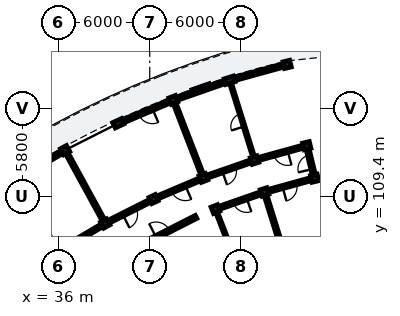
"""IFC4 building model, lengths in metres.
Left out: names, types, materials, properties, quantities, classifications, styles, units other than length and angle.
Written with IfcOpenShell. Run it as: python <this file> out.ifc"""

import sys

from ifc_helpers import new_model, si_unit, direction, frame, frame_2d, origin, origin_2d, place, context, subcontext, project, spatial, rectangle, extrude, element, fill, save


model = new_model("IFC4")
c1 = context("Model", 3, precision=1e-05, world=origin(), true_north=direction((0.0, 1.0)))
c2 = subcontext(c1, "Body", "Model", "MODEL_VIEW")
j1 = project(units=[si_unit("LENGTHUNIT", "METRE"), si_unit("PLANEANGLEUNIT", "RADIAN")], contexts=[c1])
p1 = place(None, origin())
s1 = spatial("IfcSite", under=j1, at=p1, CompositionType="ELEMENT")
p2 = place(p1, origin())
s2 = spatial("IfcBuilding", under=s1, at=p2, CompositionType="ELEMENT")
p3 = place(p2, frame((0.0, 0.0, 42.44)))
s3 = spatial("IfcBuildingStorey", under=s2, at=p3, CompositionType="ELEMENT", Elevation=42.44)
for number, where, z_axis, x_axis in (
    (1, (52.847, 110.606, 0.0), (0.0, 0.0, 1.0), (-0.234, 0.972, 0.0)),
    (2, (52.331, 112.744, 0.0), (0.0, 0.0, 1.0), (-0.234, 0.972, 0.0)),
    (3, (51.042, 118.091, 0.0), (0.0, 0.0, 1.0), (-0.234, 0.972, 0.0)),
    (4, (49.552, 109.695, 0.0), (0.0, 0.0, 1.0), (-0.298, 0.955, 0.0)),
    (5, (48.897, 111.795, 0.0), (0.0, 0.0, 1.0), (-0.298, 0.955, 0.0)),
):
    element("IfcColumn", number, at=place(p3, frame(where, z_axis=z_axis, x_axis=x_axis)), inside=s3, PredefinedType="COLUMN", context=c2, shape_type="SweptSolid", body=[
        extrude(rectangle(XDim=0.45, YDim=0.45, at=origin_2d()), origin(), (0.0, 0.0, 1.0), 3.12),
    ])
p4 = place(p3, frame((47.258, 117.046, 0.0), z_axis=(0.0, 0.0, 1.0), x_axis=(-0.297930292146, 0.954587628781, 0.0)))
e6 = element("IfcColumn", 6, at=p4, inside=s3, PredefinedType="PILASTER", context=c2, shape_type="SweptSolid", body=[
    extrude(rectangle(XDim=0.39, YDim=0.63, at=origin_2d()), origin(), (0.0, 0.0, 1.0), 3.12),
])
for number, where, z_axis, x_axis in (
    (7, (46.325, 108.57, 0.0), (0.0, 0.0, 1.0), (-0.36, 0.933, 0.0)),
    (8, (45.532, 110.622, 0.0), (0.0, 0.0, 1.0), (-0.36, 0.933, 0.0)),
    (9, (43.552, 115.753, 0.0), (0.0, 0.0, 1.0), (-0.36, 0.933, 0.0)),
    (10, (42.252, 109.23, 0.0), (0.0, 0.0, 1.0), (-0.421, 0.907, 0.0)),
):
    element("IfcColumn", number, at=place(p3, frame(where, z_axis=z_axis, x_axis=x_axis)), inside=s3, PredefinedType="COLUMN", context=c2, shape_type="SweptSolid", body=[
        extrude(rectangle(XDim=0.45, YDim=0.45, at=origin_2d()), origin(), (0.0, 0.0, 1.0), 3.12),
    ])
p5 = place(p3, frame((39.938, 114.219, 0.0), z_axis=(0.0, 0.0, 1.0), x_axis=(-0.420859924104, 0.907125638643, 0.0)))
e11 = element("IfcColumn", 11, at=p5, inside=s3, PredefinedType="PILASTER", context=c2, shape_type="SweptSolid", body=[
    extrude(rectangle(XDim=0.39, YDim=0.63, at=origin_2d()), origin(), (0.0, 0.0, 1.0), 3.12),
])
for number, where, z_axis, x_axis in (
    (12, (39.072, 107.625, 0.0), (0.0, 0.0, 1.0), (-0.48, 0.877, 0.0)),
    (13, (36.433, 112.451, 0.0), (0.0, 0.0, 1.0), (-0.48, 0.877, 0.0)),
):
    element("IfcColumn", number, at=place(p3, frame(where, z_axis=z_axis, x_axis=x_axis)), inside=s3, PredefinedType="COLUMN", context=c2, shape_type="SweptSolid", body=[
        extrude(rectangle(XDim=0.45, YDim=0.45, at=origin_2d()), origin(), (0.0, 0.0, 1.0), 3.12),
    ])
p6 = place(p3, frame((50.854, 118.039, 0.0), z_axis=(0.0, 0.0, 1.0), x_axis=(-0.963879958287, -0.266337053398, 0.0)))
e14 = element("IfcWall", 14, at=p6, inside=s3, PredefinedType="SOLIDWALL", context=c2, shape_type="SweptSolid", body=[
    extrude(rectangle(XDim=3.566, YDim=0.225, at=frame_2d((1.783, 0.0))), origin(), (0.0, 0.0, 1.0), 2.355),
])
p7 = place(p6, frame((1.043, 0.0, 0.55)))
e15 = element("IfcOpeningElement", 15, at=p7, cuts=e14, PredefinedType="OPENING", context=c2, shape_type="SweptSolid", body=[
    extrude(rectangle(XDim=1.48, YDim=1.62, at=frame_2d((0.74, 0.81))), frame((0.0, 0.123, 0.0), z_axis=(0.0, -1.0, 0.0), x_axis=(1.0, 0.0, 0.0)), (0.0, 0.0, 1.0), 0.245),
])
p8 = place(p3, frame((47.103, 116.991, 0.0), z_axis=(0.0, 0.0, 1.0), x_axis=(-0.944238799482, -0.329261430405, 0.0)))
e16 = element("IfcWall", 16, at=p8, inside=s3, PredefinedType="SOLIDWALL", context=c2, shape_type="SweptSolid", body=[
    extrude(rectangle(XDim=3.566, YDim=0.225, at=frame_2d((1.783, 0.0))), origin(), (0.0, 0.0, 1.0), 2.355),
])
p9 = place(p8, frame((1.183, 0.0, 0.55)))
e17 = element("IfcOpeningElement", 17, at=p9, cuts=e16, PredefinedType="OPENING", context=c2, shape_type="SweptSolid", body=[
    extrude(rectangle(XDim=1.2, YDim=1.51, at=frame_2d((0.6, 0.755))), frame((0.0, 0.123, 0.0), z_axis=(0.0, -1.0, 0.0), x_axis=(1.0, 0.0, 0.0)), (0.0, 0.0, 1.0), 0.245),
])
p10 = place(p3, frame((43.372, 115.677, 0.0), z_axis=(0.0, 0.0, 1.0), x_axis=(-0.920495973723, -0.390752047161, 0.0)))
e18 = element("IfcWall", 18, at=p10, inside=s3, PredefinedType="SOLIDWALL", context=c2, shape_type="SweptSolid", body=[
    extrude(rectangle(XDim=3.566, YDim=0.225, at=frame_2d((1.783, 0.0))), origin(), (0.0, 0.0, 1.0), 2.355),
])
p11 = place(p10, frame((1.293, 0.0, 0.0)))
e19 = element("IfcOpeningElement", 19, at=p11, cuts=e18, PredefinedType="OPENING", context=c2, shape_type="SweptSolid", body=[
    extrude(rectangle(XDim=0.98, YDim=2.12, at=frame_2d((0.49, 1.06))), frame((0.0, 0.123, 0.0), z_axis=(0.0, -1.0, 0.0), x_axis=(1.0, 0.0, 0.0)), (0.0, 0.0, 1.0), 0.245),
])
p12 = place(p3, frame((36.265, 112.352, 0.0), z_axis=(0.0, 0.0, 1.0), x_axis=(-0.861132283606, -0.508380949811, 0.0)))
e20 = element("IfcWall", 20, at=p12, inside=s3, PredefinedType="SOLIDWALL", context=c2, shape_type="SweptSolid", body=[
    extrude(rectangle(XDim=3.566, YDim=0.225, at=frame_2d((1.783, 0.0))), origin(), (0.0, 0.0, 1.0), 2.355),
])
p13 = place(p12, frame((1.003, 0.0, 0.55)))
e21 = element("IfcOpeningElement", 21, at=p13, cuts=e20, PredefinedType="OPENING", context=c2, shape_type="SweptSolid", body=[
    extrude(rectangle(XDim=1.56, YDim=1.51, at=frame_2d((0.78, 0.755))), frame((0.0, 0.123, 0.0), z_axis=(0.0, -1.0, 0.0), x_axis=(1.0, 0.0, 0.0)), (0.0, 0.0, 1.0), 0.245),
])
p14 = place(p3, frame((40.682, 105.834, 0.0), z_axis=(0.0, 0.0, 1.0), x_axis=(0.891003372311, 0.453996685595, 0.0)))
e22 = element("IfcWall", 22, at=p14, inside=s3, PredefinedType="PARTITIONING", context=c2, shape_type="SweptSolid", body=[
    extrude(rectangle(XDim=4.9, YDim=0.22, at=frame_2d((2.45, 0.0))), origin(), (0.0, 0.0, 1.0), 2.34),
])
p15 = place(p14, frame((1.95, 0.0, 0.0)))
e23 = element("IfcOpeningElement", 23, at=p15, cuts=e22, PredefinedType="OPENING", context=c2, shape_type="SweptSolid", body=[
    extrude(rectangle(XDim=1.0, YDim=2.15, at=frame_2d((0.5, 1.075))), frame((0.0, 0.12, 0.0), z_axis=(0.0, -1.0, 0.0), x_axis=(1.0, 0.0, 0.0)), (0.0, 0.0, 1.0), 0.24),
])
p16 = place(p3, frame((51.994, 112.651, 0.0), z_axis=(0.0, 0.0, 1.0), x_axis=(-0.963890789093, -0.266297853356, 0.0)))
e24 = element("IfcWall", 24, at=p16, inside=s3, PredefinedType="PARTITIONING", context=c2, shape_type="SweptSolid", body=[
    extrude(rectangle(XDim=2.863, YDim=0.205, at=frame_2d((1.432, 0.0))), origin(), (0.0, 0.0, 1.0), 2.37),
])
p17 = place(p16, frame((0.957, 0.0, 0.0)))
e25 = element("IfcOpeningElement", 25, at=p17, cuts=e24, PredefinedType="OPENING", context=c2, shape_type="SweptSolid", body=[
    extrude(rectangle(XDim=0.95, YDim=2.13, at=frame_2d((0.475, 1.065))), frame((0.0, 0.113, 0.0), z_axis=(0.0, -1.0, 0.0), x_axis=(1.0, 0.0, 0.0)), (0.0, 0.0, 1.0), 0.225),
])
p18 = place(p3, frame((52.51, 110.512, 0.0), z_axis=(0.0, 0.0, 1.0), x_axis=(-0.96388375821, -0.266323301006, 0.0)))
e26 = element("IfcWall", 26, at=p18, inside=s3, PredefinedType="PARTITIONING", context=c2, shape_type="SweptSolid", body=[
    extrude(rectangle(XDim=2.718, YDim=0.205, at=frame_2d((1.359, 0.0))), origin(), (0.0, 0.0, 1.0), 2.37),
])
p19 = place(p18, frame((0.884, 0.0, 0.0)))
e27 = element("IfcOpeningElement", 27, at=p19, cuts=e26, PredefinedType="OPENING", context=c2, shape_type="SweptSolid", body=[
    extrude(rectangle(XDim=0.95, YDim=2.13, at=frame_2d((0.475, 1.065))), frame((0.0, 0.113, 0.0), z_axis=(0.0, -1.0, 0.0), x_axis=(1.0, 0.0, 0.0)), (0.0, 0.0, 1.0), 0.225),
])
p20 = place(p3, frame((48.778, 112.177, 0.0), z_axis=(0.0, 0.0, 1.0), x_axis=(-0.297905254614, 0.954595442726, 0.0)))
e28 = element("IfcWall", 28, at=p20, inside=s3, PredefinedType="PARTITIONING", context=c2, shape_type="SweptSolid", body=[
    extrude(rectangle(XDim=4.7, YDim=0.125, at=frame_2d((2.35, 0.0))), origin(), (0.0, 0.0, 1.0), 2.37),
])
p21 = place(p20, frame((1.915, 0.0, 0.0)))
e29 = element("IfcOpeningElement", 29, at=p21, cuts=e28, PredefinedType="OPENING", context=c2, shape_type="SweptSolid", body=[
    extrude(rectangle(XDim=0.87, YDim=2.08, at=frame_2d((0.435, 1.04))), frame((0.0, 0.073, 0.0), z_axis=(0.0, -1.0, 0.0), x_axis=(1.0, 0.0, 0.0)), (0.0, 0.0, 1.0), 0.145),
])
p22 = place(p3, frame((51.638, 103.013, 0.0), z_axis=(0.0, 0.0, 1.0), x_axis=(-0.2979590431, 0.954578655028, 0.0)))
e30 = element("IfcWall", 30, at=p22, inside=s3, PredefinedType="PARTITIONING", context=c2, shape_type="SweptSolid", body=[
    extrude(rectangle(XDim=6.6, YDim=0.185, at=frame_2d((3.3, 0.0))), origin(), (0.0, 0.0, 1.0), 2.37),
])
p23 = place(p3, frame((48.566, 111.68, 0.0), z_axis=(0.0, 0.0, 1.0), x_axis=(-0.944253820929, -0.329218349522, 0.0)))
e31 = element("IfcWall", 31, at=p23, inside=s3, PredefinedType="PARTITIONING", context=c2, shape_type="SweptSolid", body=[
    extrude(rectangle(XDim=2.863, YDim=0.205, at=frame_2d((1.432, 0.0))), origin(), (0.0, 0.0, 1.0), 2.37),
])
p24 = place(p23, frame((0.967, 0.0, 0.0)))
e32 = element("IfcOpeningElement", 32, at=p24, cuts=e31, PredefinedType="OPENING", context=c2, shape_type="SweptSolid", body=[
    extrude(rectangle(XDim=0.93, YDim=2.12, at=frame_2d((0.465, 1.06))), frame((0.0, 0.113, 0.0), z_axis=(0.0, -1.0, 0.0), x_axis=(1.0, 0.0, 0.0)), (0.0, 0.0, 1.0), 0.225),
])
p25 = place(p3, frame((49.222, 109.58, 0.0), z_axis=(0.0, 0.0, 1.0), x_axis=(-0.944265123647, -0.329185929627, 0.0)))
e33 = element("IfcWall", 33, at=p25, inside=s3, PredefinedType="PARTITIONING", context=c2, shape_type="SweptSolid", body=[
    extrude(rectangle(XDim=2.718, YDim=0.205, at=frame_2d((1.359, 0.0))), origin(), (0.0, 0.0, 1.0), 2.37),
])
p26 = place(p25, frame((0.894, 0.0, 0.0)))
e34 = element("IfcOpeningElement", 34, at=p26, cuts=e33, PredefinedType="OPENING", context=c2, shape_type="SweptSolid", body=[
    extrude(rectangle(XDim=0.93, YDim=2.12, at=frame_2d((0.465, 1.06))), frame((0.0, 0.113, 0.0), z_axis=(0.0, -1.0, 0.0), x_axis=(1.0, 0.0, 0.0)), (0.0, 0.0, 1.0), 0.225),
])
p27 = place(p3, frame((45.388, 110.996, 0.0), z_axis=(0.0, 0.0, 1.0), x_axis=(-0.360186633854, 0.932880264982, 0.0)))
e35 = element("IfcWall", 35, at=p27, inside=s3, PredefinedType="PARTITIONING", context=c2, shape_type="SweptSolid", body=[
    extrude(rectangle(XDim=4.7, YDim=0.185, at=frame_2d((2.35, 0.0))), origin(), (0.0, 0.0, 1.0), 2.37),
])
p28 = place(p3, frame((48.846, 102.04, 0.0), z_axis=(0.0, 0.0, 1.0), x_axis=(-0.360183473608, 0.932881485152, 0.0)))
e36 = element("IfcWall", 36, at=p28, inside=s3, PredefinedType="PARTITIONING", context=c2, shape_type="SweptSolid", body=[
    extrude(rectangle(XDim=6.6, YDim=0.125, at=frame_2d((3.3, 0.0))), origin(), (0.0, 0.0, 1.0), 2.37),
])
p29 = place(p28, frame((2.855, 0.0, 0.0)))
e37 = element("IfcOpeningElement", 37, at=p29, cuts=e36, PredefinedType="OPENING", context=c2, shape_type="SweptSolid", body=[
    extrude(rectangle(XDim=0.89, YDim=2.1, at=frame_2d((0.445, 1.05))), frame((0.0, 0.073, 0.0), z_axis=(0.0, -1.0, 0.0), x_axis=(1.0, 0.0, 0.0)), (0.0, 0.0, 1.0), 0.145),
])
p30 = place(p3, frame((45.21, 110.486, 0.0), z_axis=(0.0, 0.0, 1.0), x_axis=(-0.920511160294, -0.390716270168, 0.0)))
e38 = element("IfcWall", 38, at=p30, inside=s3, PredefinedType="PARTITIONING", context=c2, shape_type="SweptSolid", body=[
    extrude(rectangle(XDim=2.863, YDim=0.205, at=frame_2d((1.432, 0.0))), origin(), (0.0, 0.0, 1.0), 2.37),
])
p31 = place(p30, frame((0.937, 0.0, 0.0)))
e39 = element("IfcOpeningElement", 39, at=p31, cuts=e38, PredefinedType="OPENING", context=c2, shape_type="SweptSolid", body=[
    extrude(rectangle(XDim=0.99, YDim=2.16, at=frame_2d((0.495, 1.08))), frame((0.0, 0.113, 0.0), z_axis=(0.0, -1.0, 0.0), x_axis=(1.0, 0.0, 0.0)), (0.0, 0.0, 1.0), 0.225),
])
p32 = place(p3, frame((41.94, 109.073, 0.0), z_axis=(0.0, 0.0, 1.0), x_axis=(-0.89273239336, -0.450587254419, 0.0)))
e40 = element("IfcWall", 40, at=p32, inside=s3, PredefinedType="PARTITIONING", context=c2, shape_type="SweptSolid", body=[
    extrude(rectangle(XDim=2.863, YDim=0.205, at=frame_2d((1.432, 0.0))), origin(), (0.0, 0.0, 1.0), 2.37),
])
p33 = place(p32, frame((0.947, 0.0, 0.0)))
e41 = element("IfcOpeningElement", 41, at=p33, cuts=e40, PredefinedType="OPENING", context=c2, shape_type="SweptSolid", body=[
    extrude(rectangle(XDim=0.97, YDim=2.15, at=frame_2d((0.485, 1.075))), frame((0.0, 0.113, 0.0), z_axis=(0.0, -1.0, 0.0), x_axis=(1.0, 0.0, 0.0)), (0.0, 0.0, 1.0), 0.225),
])
p34 = place(p3, frame((38.88, 107.976, 0.0), z_axis=(0.0, 0.0, 1.0), x_axis=(-0.479721743761, 0.877420679357, 0.0)))
e42 = element("IfcWall", 42, at=p34, inside=s3, PredefinedType="PARTITIONING", context=c2, shape_type="SweptSolid", body=[
    extrude(rectangle(XDim=4.7, YDim=0.185, at=frame_2d((2.35, 0.0))), origin(), (0.0, 0.0, 1.0), 2.37),
])
p35 = place(p3, frame((38.77, 107.447, 0.0), z_axis=(0.0, 0.0, 1.0), x_axis=(-0.861113214678, -0.508413248753, 0.0)))
e43 = element("IfcWall", 43, at=p35, inside=s3, PredefinedType="PARTITIONING", context=c2, shape_type="SweptSolid", body=[
    extrude(rectangle(XDim=2.863, YDim=0.205, at=frame_2d((1.432, 0.0))), origin(), (0.0, 0.0, 1.0), 2.37),
])
p36 = place(p35, frame((0.957, 0.0, 0.0)))
e44 = element("IfcOpeningElement", 44, at=p36, cuts=e43, PredefinedType="OPENING", context=c2, shape_type="SweptSolid", body=[
    extrude(rectangle(XDim=0.95, YDim=2.13, at=frame_2d((0.475, 1.065))), frame((0.0, 0.113, 0.0), z_axis=(0.0, -1.0, 0.0), x_axis=(1.0, 0.0, 0.0)), (0.0, 0.0, 1.0), 0.225),
])
p37 = place(p3, frame((35.789, 106.151, 0.0), z_axis=(0.0, 0.0, 1.0), x_axis=(-0.536492262982, 0.843905238614, 0.0)))
e45 = element("IfcWall", 45, at=p37, inside=s3, PredefinedType="PARTITIONING", context=c2, shape_type="SweptSolid", body=[
    extrude(rectangle(XDim=4.7, YDim=0.125, at=frame_2d((2.35, 0.0))), origin(), (0.0, 0.0, 1.0), 2.37),
])
p38 = place(p37, frame((1.895, 0.0, 0.0)))
e46 = element("IfcOpeningElement", 46, at=p38, cuts=e45, PredefinedType="OPENING", context=c2, shape_type="SweptSolid", body=[
    extrude(rectangle(XDim=0.91, YDim=2.1, at=frame_2d((0.455, 1.05))), frame((0.0, 0.073, 0.0), z_axis=(0.0, -1.0, 0.0), x_axis=(1.0, 0.0, 0.0)), (0.0, 0.0, 1.0), 0.145),
])
p39 = place(p3, frame((52.835, 110.654, 0.0), z_axis=(0.0, 0.0, 1.0), x_axis=(-0.23437535251, 0.972146179407, 0.0)))
e47 = element("IfcWall", 47, at=p39, inside=s3, PredefinedType="PARTITIONING", context=c2, shape_type="SweptSolid", body=[
    extrude(rectangle(XDim=2.1, YDim=0.205, at=frame_2d((1.05, 0.0))), origin(), (0.0, 0.0, 1.0), 2.37),
])
p40 = place(p39, frame((0.57, 0.0, 0.0)))
e48 = element("IfcOpeningElement", 48, at=p40, cuts=e47, PredefinedType="OPENING", context=c2, shape_type="SweptSolid", body=[
    extrude(rectangle(XDim=0.95, YDim=2.13, at=frame_2d((0.475, 1.065))), frame((0.0, 0.113, 0.0), z_axis=(0.0, -1.0, 0.0), x_axis=(1.0, 0.0, 0.0)), (0.0, 0.0, 1.0), 0.225),
])
p41 = place(p7, origin())
e49 = element("IfcWindow", 49, at=p41, inside=s3, PartitioningType="SINGLE_PANEL", PredefinedType="WINDOW", context=c2, shape_type="SweptSolid", body=[
    extrude(rectangle(XDim=1.48, YDim=1.62, at=frame_2d((0.74, 0.81))), frame((0.0, 0.03, 0.0), z_axis=(0.0, -1.0, 0.0), x_axis=(1.0, 0.0, 0.0)), (0.0, 0.0, 1.0), 0.06),
])
fill(e15, e49)
p42 = place(p9, origin())
e50 = element("IfcWindow", 50, at=p42, inside=s3, PartitioningType="SINGLE_PANEL", PredefinedType="WINDOW", context=c2, shape_type="SweptSolid", body=[
    extrude(rectangle(XDim=1.2, YDim=1.51, at=frame_2d((0.6, 0.755))), frame((0.0, 0.03, 0.0), z_axis=(0.0, -1.0, 0.0), x_axis=(1.0, 0.0, 0.0)), (0.0, 0.0, 1.0), 0.06),
])
fill(e17, e50)
p43 = place(p11, origin())
e51 = element("IfcDoor", 51, at=p43, inside=s3, OperationType="SINGLE_SWING_LEFT", PredefinedType="DOOR", context=c2, shape_type="SweptSolid", body=[
    extrude(rectangle(XDim=0.98, YDim=2.12, at=frame_2d((0.49, 1.06))), frame((0.0, 0.025, 0.0), z_axis=(0.0, -1.0, 0.0), x_axis=(1.0, 0.0, 0.0)), (0.0, 0.0, 1.0), 0.05),
])
fill(e19, e51)
p44 = place(p15, origin())
e52 = element("IfcDoor", 52, at=p44, inside=s3, OperationType="SINGLE_SWING_LEFT", PredefinedType="DOOR", context=c2, shape_type="SweptSolid", body=[
    extrude(rectangle(XDim=1.0, YDim=2.15, at=frame_2d((0.5, 1.075))), frame((0.0, 0.025, 0.0), z_axis=(0.0, -1.0, 0.0), x_axis=(1.0, 0.0, 0.0)), (0.0, 0.0, 1.0), 0.05),
])
fill(e23, e52)
p45 = place(p17, origin())
e53 = element("IfcDoor", 53, at=p45, inside=s3, OperationType="SINGLE_SWING_LEFT", PredefinedType="DOOR", context=c2, shape_type="SweptSolid", body=[
    extrude(rectangle(XDim=0.95, YDim=2.13, at=frame_2d((0.475, 1.065))), frame((0.0, 0.025, 0.0), z_axis=(0.0, -1.0, 0.0), x_axis=(1.0, 0.0, 0.0)), (0.0, 0.0, 1.0), 0.05),
])
fill(e25, e53)
p46 = place(p19, origin())
e54 = element("IfcDoor", 54, at=p46, inside=s3, OperationType="SINGLE_SWING_RIGHT", PredefinedType="DOOR", context=c2, shape_type="SweptSolid", body=[
    extrude(rectangle(XDim=0.95, YDim=2.13, at=frame_2d((0.475, 1.065))), frame((0.0, 0.025, 0.0), z_axis=(0.0, -1.0, 0.0), x_axis=(1.0, 0.0, 0.0)), (0.0, 0.0, 1.0), 0.05),
])
fill(e27, e54)
p47 = place(p21, origin())
e55 = element("IfcDoor", 55, at=p47, inside=s3, OperationType="SINGLE_SWING_LEFT", PredefinedType="DOOR", context=c2, shape_type="SweptSolid", body=[
    extrude(rectangle(XDim=0.87, YDim=2.08, at=frame_2d((0.435, 1.04))), frame((0.0, 0.025, 0.0), z_axis=(0.0, -1.0, 0.0), x_axis=(1.0, 0.0, 0.0)), (0.0, 0.0, 1.0), 0.05),
])
fill(e29, e55)
p48 = place(p24, origin())
e56 = element("IfcDoor", 56, at=p48, inside=s3, OperationType="SINGLE_SWING_RIGHT", PredefinedType="DOOR", context=c2, shape_type="SweptSolid", body=[
    extrude(rectangle(XDim=0.93, YDim=2.12, at=frame_2d((0.465, 1.06))), frame((0.0, 0.025, 0.0), z_axis=(0.0, -1.0, 0.0), x_axis=(1.0, 0.0, 0.0)), (0.0, 0.0, 1.0), 0.05),
])
fill(e32, e56)
p49 = place(p26, origin())
e57 = element("IfcDoor", 57, at=p49, inside=s3, OperationType="SINGLE_SWING_LEFT", PredefinedType="DOOR", context=c2, shape_type="SweptSolid", body=[
    extrude(rectangle(XDim=0.93, YDim=2.12, at=frame_2d((0.465, 1.06))), frame((0.0, 0.025, 0.0), z_axis=(0.0, -1.0, 0.0), x_axis=(1.0, 0.0, 0.0)), (0.0, 0.0, 1.0), 0.05),
])
fill(e34, e57)
p50 = place(p31, origin())
e58 = element("IfcDoor", 58, at=p50, inside=s3, OperationType="SINGLE_SWING_LEFT", PredefinedType="DOOR", context=c2, shape_type="SweptSolid", body=[
    extrude(rectangle(XDim=0.99, YDim=2.16, at=frame_2d((0.495, 1.08))), frame((0.0, 0.025, 0.0), z_axis=(0.0, -1.0, 0.0), x_axis=(1.0, 0.0, 0.0)), (0.0, 0.0, 1.0), 0.05),
])
fill(e39, e58)
p51 = place(p33, origin())
e59 = element("IfcDoor", 59, at=p51, inside=s3, OperationType="SINGLE_SWING_RIGHT", PredefinedType="DOOR", context=c2, shape_type="SweptSolid", body=[
    extrude(rectangle(XDim=0.97, YDim=2.15, at=frame_2d((0.485, 1.075))), frame((0.0, 0.025, 0.0), z_axis=(0.0, -1.0, 0.0), x_axis=(1.0, 0.0, 0.0)), (0.0, 0.0, 1.0), 0.05),
])
fill(e41, e59)
p52 = place(p36, origin())
e60 = element("IfcDoor", 60, at=p52, inside=s3, OperationType="SINGLE_SWING_LEFT", PredefinedType="DOOR", context=c2, shape_type="SweptSolid", body=[
    extrude(rectangle(XDim=0.95, YDim=2.13, at=frame_2d((0.475, 1.065))), frame((0.0, 0.025, 0.0), z_axis=(0.0, -1.0, 0.0), x_axis=(1.0, 0.0, 0.0)), (0.0, 0.0, 1.0), 0.05),
])
fill(e44, e60)
p53 = place(p40, origin())
e61 = element("IfcDoor", 61, at=p53, inside=s3, OperationType="SINGLE_SWING_LEFT", PredefinedType="DOOR", context=c2, shape_type="SweptSolid", body=[
    extrude(rectangle(XDim=0.95, YDim=2.13, at=frame_2d((0.475, 1.065))), frame((0.0, 0.025, 0.0), z_axis=(0.0, -1.0, 0.0), x_axis=(1.0, 0.0, 0.0)), (0.0, 0.0, 1.0), 0.05),
])
fill(e48, e61)
save(model, sys.argv[1])
